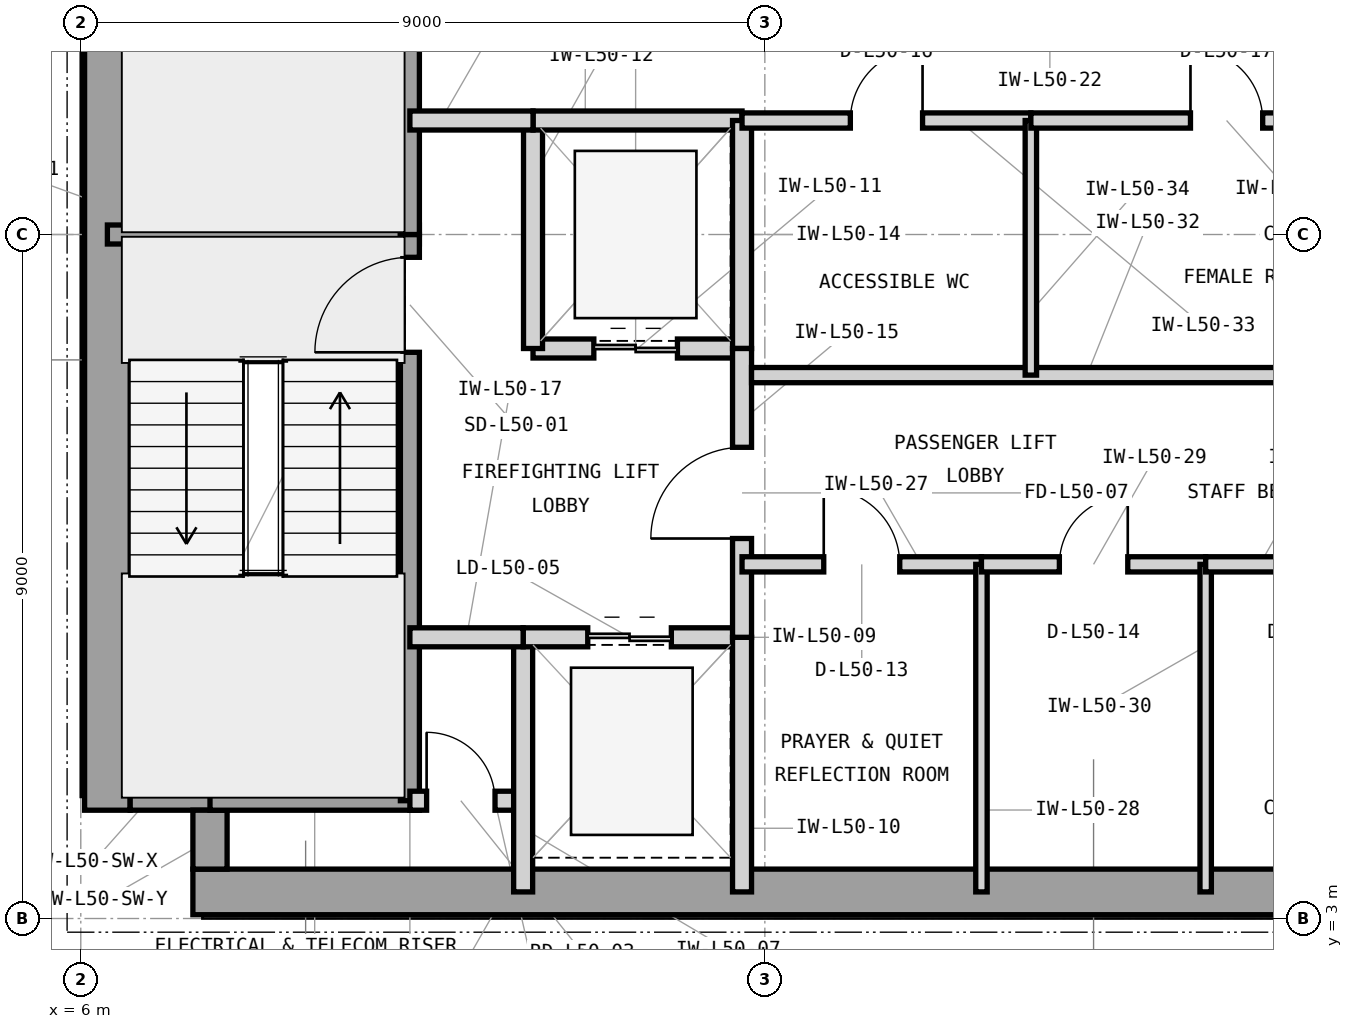
"""IFC4 building model, lengths in metres.
Left out: names, types, materials, properties, quantities, classifications, styles, units other than length and angle.
Written with IfcOpenShell. Run it as: python <this file> out.ifc"""

import sys

from ifc_helpers import new_model, si_unit, direction, frame, frame_2d, origin, place, context, subcontext, project, spatial, rectangle, extrude, element, fill, save


model = new_model("IFC4")
c1 = context("Model", 3, precision=1e-05, world=origin(), true_north=direction((0.0, 1.0)))
c2 = subcontext(c1, "Body", "Model", "MODEL_VIEW")
j1 = project(units=[si_unit("LENGTHUNIT", "METRE"), si_unit("PLANEANGLEUNIT", "RADIAN")], contexts=[c1])
p1 = place(None, origin())
s1 = spatial("IfcSite", under=j1, at=p1, CompositionType="ELEMENT")
p2 = place(p1, origin())
s2 = spatial("IfcBuilding", under=s1, at=p2, CompositionType="ELEMENT")
p3 = place(p2, frame((0.0, 0.0, 207.3)))
s3 = spatial("IfcBuildingStorey", under=s2, at=p3, CompositionType="ELEMENT", Elevation=207.3)
p4 = place(p3, frame((7.475, 3.35, 0.0), z_axis=(0.0, 0.0, 1.0), x_axis=(1.0, 0.0, 0.0)))
e1 = element("IfcWall", 1, at=p4, inside=s3, PredefinedType="SHEAR", context=c2, shape_type="SweptSolid", body=[
    extrude(rectangle(XDim=16.475, YDim=0.6, at=frame_2d((8.237, 0.0))), origin(), (0.0, 0.0, 1.0), 3.9),
])
p5 = place(p3, frame((6.35, 4.425, 0.0), z_axis=(0.0, 0.0, 1.0), x_axis=(0.0, 1.0, 0.0)))
e2 = element("IfcWall", 2, at=p5, inside=s3, PredefinedType="SHEAR", context=c2, shape_type="SweptSolid", body=[
    extrude(rectangle(XDim=15.15, YDim=0.6, at=frame_2d((7.575, 0.0))), origin(), (0.0, 0.0, 1.0), 3.9),
])
p6 = place(p3, frame((6.65, 4.65, 0.0), z_axis=(0.0, 0.0, 1.0), x_axis=(1.0, 0.0, 0.0)))
e3 = element("IfcWall", 3, at=p6, inside=s3, PredefinedType="SHEAR", context=c2, shape_type="SweptSolid", body=[
    extrude(rectangle(XDim=1.275, YDim=0.45, at=frame_2d((0.638, 0.0))), origin(), (0.0, 0.0, 1.0), 3.9),
])
p7 = place(p3, frame((7.7, 3.65, 0.0), z_axis=(0.0, 0.0, 1.0), x_axis=(0.0, 1.0, 0.0)))
e4 = element("IfcWall", 4, at=p7, inside=s3, PredefinedType="SHEAR", context=c2, shape_type="SweptSolid", body=[
    extrude(rectangle(XDim=0.775, YDim=0.45, at=frame_2d((0.388, 0.0))), origin(), (0.0, 0.0, 1.0), 3.9),
])
p8 = place(p3, frame((6.35, 12.0, 0.0), z_axis=(0.0, 0.0, 1.0), x_axis=(1.0, 0.0, 0.0)))
e5 = element("IfcWall", 5, at=p8, inside=s3, PredefinedType="SHEAR", context=c2, shape_type="SweptSolid", body=[
    extrude(rectangle(XDim=4.105, YDim=0.25, at=frame_2d((2.052, 0.0))), origin(), (0.0, 0.0, 1.0), 3.9),
])
p9 = place(p3, frame((7.7, 4.55, 0.0), z_axis=(0.0, 0.0, 1.0), x_axis=(1.0, 0.0, 0.0)))
e6 = element("IfcWall", 6, at=p9, inside=s3, PredefinedType="SHEAR", context=c2, shape_type="SweptSolid", body=[
    extrude(rectangle(XDim=2.755, YDim=0.25, at=frame_2d((1.377, 0.0))), origin(), (0.0, 0.0, 1.0), 3.9),
])
p10 = place(p3, frame((10.33, 4.55, 0.0), z_axis=(0.0, 0.0, 1.0), x_axis=(0.0, 1.0, 0.0)))
e7 = element("IfcWall", 7, at=p10, inside=s3, PredefinedType="SHEAR", context=c2, shape_type="SweptSolid", body=[
    extrude(rectangle(XDim=7.45, YDim=0.25, at=frame_2d((3.725, 0.0))), origin(), (0.0, 0.0, 1.0), 3.9),
])
p11 = place(p10, frame((5.9, 0.0, 0.0)))
e8 = element("IfcOpeningElement", 8, at=p11, cuts=e7, PredefinedType="OPENING", context=c2, shape_type="SweptSolid", body=[
    extrude(rectangle(XDim=1.25, YDim=2.2, at=frame_2d((0.625, 1.1))), frame((0.0, 0.135, 0.0), z_axis=(0.0, -1.0, 0.0), x_axis=(1.0, 0.0, 0.0)), (0.0, 0.0, 1.0), 0.27),
])
p12 = place(p3, frame((10.33, 12.0, 0.0), z_axis=(0.0, 0.0, 1.0), x_axis=(0.0, 1.0, 0.0)))
e9 = element("IfcWall", 9, at=p12, inside=s3, PredefinedType="SHEAR", context=c2, shape_type="SweptSolid", body=[
    extrude(rectangle(XDim=7.45, YDim=0.25, at=frame_2d((3.725, 0.0))), origin(), (0.0, 0.0, 1.0), 3.9),
])
p13 = place(p12, frame((5.85, 0.0, 0.0)))
e10 = element("IfcOpeningElement", 10, at=p13, cuts=e9, PredefinedType="OPENING", context=c2, shape_type="SweptSolid", body=[
    extrude(rectangle(XDim=1.25, YDim=2.2, at=frame_2d((0.625, 1.1))), frame((0.0, 0.135, 0.0), z_axis=(0.0, -1.0, 0.0), x_axis=(1.0, 0.0, 0.0)), (0.0, 0.0, 1.0), 0.27),
])
p14 = place(p3, frame((10.33, 4.55, 0.0), z_axis=(0.0, 0.0, 1.0), x_axis=(1.0, 0.0, 0.0)))
e11 = element("IfcWall", 11, at=p14, inside=s3, PredefinedType="PARTITIONING", context=c2, shape_type="SweptSolid", body=[
    extrude(rectangle(XDim=1.49, YDim=0.25, at=frame_2d((0.745, 0.0))), origin(), (0.0, 0.0, 1.0), 3.69),
])
p15 = place(p14, frame((0.22, 0.0, 0.0)))
e12 = element("IfcOpeningElement", 12, at=p15, cuts=e11, PredefinedType="OPENING", context=c2, shape_type="SweptSolid", body=[
    extrude(rectangle(XDim=0.9, YDim=2.1, at=frame_2d((0.45, 1.05))), frame((0.0, 0.135, 0.0), z_axis=(0.0, -1.0, 0.0), x_axis=(1.0, 0.0, 0.0)), (0.0, 0.0, 1.0), 0.27),
])
p16 = place(p3, frame((11.82, 3.35, 0.0), z_axis=(0.0, 0.0, 1.0), x_axis=(0.0, 1.0, 0.0)))
e13 = element("IfcWall", 13, at=p16, inside=s3, PredefinedType="PARTITIONING", context=c2, shape_type="SweptSolid", body=[
    extrude(rectangle(XDim=3.35, YDim=0.25, at=frame_2d((1.675, 0.0))), origin(), (0.0, 0.0, 1.0), 3.69),
])
p17 = place(p3, frame((11.82, 6.7, 0.0), z_axis=(0.0, 0.0, 1.0), x_axis=(1.0, 0.0, 0.0)))
e14 = element("IfcWall", 14, at=p17, inside=s3, PredefinedType="PARTITIONING", context=c2, shape_type="SweptSolid", body=[
    extrude(rectangle(XDim=2.88, YDim=0.25, at=frame_2d((1.44, 0.0))), origin(), (0.0, 0.0, 1.0), 3.283),
])
p18 = place(p17, frame((0.85, 0.0, 0.0)))
e15 = element("IfcOpeningElement", 15, at=p18, cuts=e14, PredefinedType="OPENING", context=c2, shape_type="SweptSolid", body=[
    extrude(rectangle(XDim=1.1, YDim=2.25, at=frame_2d((0.55, 1.125))), frame((0.0, 0.135, 0.0), z_axis=(0.0, -1.0, 0.0), x_axis=(1.0, 0.0, 0.0)), (0.0, 0.0, 1.0), 0.27),
])
p19 = place(p3, frame((14.7, 3.35, 0.0), z_axis=(0.0, 0.0, 1.0), x_axis=(0.0, 1.0, 0.0)))
e16 = element("IfcWall", 16, at=p19, inside=s3, PredefinedType="PARTITIONING", context=c2, shape_type="SweptSolid", body=[
    extrude(rectangle(XDim=3.35, YDim=0.25, at=frame_2d((1.675, 0.0))), origin(), (0.0, 0.0, 1.0), 3.69),
])
p20 = place(p3, frame((11.95, 10.5, 0.0), z_axis=(0.0, 0.0, 1.0), x_axis=(1.0, 0.0, 0.0)))
e17 = element("IfcWall", 17, at=p20, inside=s3, PredefinedType="PARTITIONING", context=c2, shape_type="SweptSolid", body=[
    extrude(rectangle(XDim=2.75, YDim=0.25, at=frame_2d((1.375, 0.0))), origin(), (0.0, 0.0, 1.0), 3.283),
])
p21 = place(p20, frame((0.8, 0.0, 0.0)))
e18 = element("IfcOpeningElement", 18, at=p21, cuts=e17, PredefinedType="OPENING", context=c2, shape_type="SweptSolid", body=[
    extrude(rectangle(XDim=1.1, YDim=2.25, at=frame_2d((0.55, 1.125))), frame((0.0, 0.135, 0.0), z_axis=(0.0, -1.0, 0.0), x_axis=(1.0, 0.0, 0.0)), (0.0, 0.0, 1.0), 0.27),
])
p22 = place(p3, frame((11.95, 10.5, 0.0), z_axis=(0.0, 0.0, 1.0), x_axis=(0.0, 1.0, 0.0)))
e19 = element("IfcWall", 19, at=p22, inside=s3, PredefinedType="PARTITIONING", context=c2, shape_type="SweptSolid", body=[
    extrude(rectangle(XDim=3.0, YDim=0.25, at=frame_2d((1.5, 0.0))), origin(), (0.0, 0.0, 1.0), 3.69),
])
p23 = place(p3, frame((11.95, 13.5, 0.0), z_axis=(0.0, 0.0, 1.0), x_axis=(1.0, 0.0, 0.0)))
e20 = element("IfcWall", 20, at=p23, inside=s3, PredefinedType="PARTITIONING", context=c2, shape_type="SweptSolid", body=[
    extrude(rectangle(XDim=2.75, YDim=0.25, at=frame_2d((1.375, 0.0))), origin(), (0.0, 0.0, 1.0), 3.283),
])
p24 = place(p3, frame((14.7, 10.5, 0.0), z_axis=(0.0, 0.0, 1.0), x_axis=(0.0, 1.0, 0.0)))
e21 = element("IfcWall", 21, at=p24, inside=s3, PredefinedType="PARTITIONING", context=c2, shape_type="SweptSolid", body=[
    extrude(rectangle(XDim=3.0, YDim=0.25, at=frame_2d((1.5, 0.0))), origin(), (0.0, 0.0, 1.0), 3.69),
])
p25 = place(p3, frame((14.7, 6.7, 0.0), z_axis=(0.0, 0.0, 1.0), x_axis=(0.0, 1.0, 0.0)))
e22 = element("IfcWall", 22, at=p25, inside=s3, PredefinedType="PARTITIONING", context=c2, shape_type="SweptSolid", body=[
    extrude(rectangle(XDim=3.8, YDim=0.25, at=frame_2d((1.9, 0.0))), origin(), (0.0, 0.0, 1.0), 3.69),
])
p26 = place(p25, frame((1.3, 0.0, 0.0)))
e23 = element("IfcOpeningElement", 23, at=p26, cuts=e22, PredefinedType="OPENING", context=c2, shape_type="SweptSolid", body=[
    extrude(rectangle(XDim=1.2, YDim=2.2, at=frame_2d((0.6, 1.1))), frame((0.0, 0.135, 0.0), z_axis=(0.0, -1.0, 0.0), x_axis=(1.0, 0.0, 0.0)), (0.0, 0.0, 1.0), 0.27),
])
p27 = place(p3, frame((10.33, 13.5, 0.0), z_axis=(0.0, 0.0, 1.0), x_axis=(1.0, 0.0, 0.0)))
e24 = element("IfcWall", 24, at=p27, inside=s3, PredefinedType="PARTITIONING", context=c2, shape_type="SweptSolid", body=[
    extrude(rectangle(XDim=1.62, YDim=0.25, at=frame_2d((0.81, 0.0))), origin(), (0.0, 0.0, 1.0), 3.283),
])
p28 = place(p3, frame((10.33, 6.7, 0.0), z_axis=(0.0, 0.0, 1.0), x_axis=(1.0, 0.0, 0.0)))
e25 = element("IfcWall", 25, at=p28, inside=s3, PredefinedType="PARTITIONING", context=c2, shape_type="SweptSolid", body=[
    extrude(rectangle(XDim=1.49, YDim=0.25, at=frame_2d((0.745, 0.0))), origin(), (0.0, 0.0, 1.0), 3.283),
])
p29 = place(p3, frame((14.7, 7.66, 0.0), z_axis=(0.0, 0.0, 1.0), x_axis=(1.0, 0.0, 0.0)))
e26 = element("IfcWall", 26, at=p29, inside=s3, PredefinedType="PARTITIONING", context=c2, shape_type="SweptSolid", body=[
    extrude(rectangle(XDim=3.15, YDim=0.2, at=frame_2d((1.575, 0.0))), origin(), (0.0, 0.0, 1.0), 3.69),
])
p30 = place(p29, frame((1.075, 0.0, 0.0)))
e27 = element("IfcOpeningElement", 27, at=p30, cuts=e26, PredefinedType="OPENING", context=c2, shape_type="SweptSolid", body=[
    extrude(rectangle(XDim=1.0, YDim=2.15, at=frame_2d((0.5, 1.075))), frame((0.0, 0.11, 0.0), z_axis=(0.0, -1.0, 0.0), x_axis=(1.0, 0.0, 0.0)), (0.0, 0.0, 1.0), 0.22),
])
p31 = place(p3, frame((17.85, 3.35, 0.0), z_axis=(0.0, 0.0, 1.0), x_axis=(0.0, 1.0, 0.0)))
e28 = element("IfcWall", 28, at=p31, inside=s3, PredefinedType="PARTITIONING", context=c2, shape_type="SweptSolid", body=[
    extrude(rectangle(XDim=4.31, YDim=0.15, at=frame_2d((2.155, 0.0))), origin(), (0.0, 0.0, 1.0), 3.69),
])
p32 = place(p3, frame((17.85, 7.66, 0.0), z_axis=(0.0, 0.0, 1.0), x_axis=(1.0, 0.0, 0.0)))
e29 = element("IfcWall", 29, at=p32, inside=s3, PredefinedType="PARTITIONING", context=c2, shape_type="SweptSolid", body=[
    extrude(rectangle(XDim=2.95, YDim=0.2, at=frame_2d((1.475, 0.0))), origin(), (0.0, 0.0, 1.0), 3.69),
])
p33 = place(p32, frame((1.025, 0.0, 0.0)))
e30 = element("IfcOpeningElement", 30, at=p33, cuts=e29, PredefinedType="OPENING", context=c2, shape_type="SweptSolid", body=[
    extrude(rectangle(XDim=0.9, YDim=2.1, at=frame_2d((0.45, 1.05))), frame((0.0, 0.11, 0.0), z_axis=(0.0, -1.0, 0.0), x_axis=(1.0, 0.0, 0.0)), (0.0, 0.0, 1.0), 0.22),
])
p34 = place(p3, frame((20.8, 3.35, 0.0), z_axis=(0.0, 0.0, 1.0), x_axis=(0.0, 1.0, 0.0)))
e31 = element("IfcWall", 31, at=p34, inside=s3, PredefinedType="PARTITIONING", context=c2, shape_type="SweptSolid", body=[
    extrude(rectangle(XDim=4.31, YDim=0.15, at=frame_2d((2.155, 0.0))), origin(), (0.0, 0.0, 1.0), 3.69),
])
p35 = place(p3, frame((20.8, 7.66, 0.0), z_axis=(0.0, 0.0, 1.0), x_axis=(1.0, 0.0, 0.0)))
e32 = element("IfcWall", 32, at=p35, inside=s3, PredefinedType="PARTITIONING", context=c2, shape_type="SweptSolid", body=[
    extrude(rectangle(XDim=2.85, YDim=0.2, at=frame_2d((1.425, 0.0))), origin(), (0.0, 0.0, 1.0), 3.69),
])
p36 = place(p35, frame((0.95, 0.0, 0.0)))
e33 = element("IfcOpeningElement", 33, at=p36, cuts=e32, PredefinedType="OPENING", context=c2, shape_type="SweptSolid", body=[
    extrude(rectangle(XDim=0.95, YDim=2.1, at=frame_2d((0.475, 1.05))), frame((0.0, 0.11, 0.0), z_axis=(0.0, -1.0, 0.0), x_axis=(1.0, 0.0, 0.0)), (0.0, 0.0, 1.0), 0.22),
])
p37 = place(p3, frame((14.825, 10.15, 0.0), z_axis=(0.0, 0.0, 1.0), x_axis=(1.0, 0.0, 0.0)))
e34 = element("IfcWall", 34, at=p37, inside=s3, PredefinedType="PARTITIONING", context=c2, shape_type="SweptSolid", body=[
    extrude(rectangle(XDim=8.825, YDim=0.2, at=frame_2d((4.413, 0.0))), origin(), (0.0, 0.0, 1.0), 3.69),
])
p38 = place(p3, frame((14.7, 13.5, 0.0), z_axis=(0.0, 0.0, 1.0), x_axis=(1.0, 0.0, 0.0)))
e35 = element("IfcWall", 35, at=p38, inside=s3, PredefinedType="PARTITIONING", context=c2, shape_type="SweptSolid", body=[
    extrude(rectangle(XDim=3.8, YDim=0.2, at=frame_2d((1.9, 0.0))), origin(), (0.0, 0.0, 1.0), 3.283),
])
p39 = place(p38, frame((1.425, 0.0, 0.0)))
e36 = element("IfcOpeningElement", 36, at=p39, cuts=e35, PredefinedType="OPENING", context=c2, shape_type="SweptSolid", body=[
    extrude(rectangle(XDim=0.95, YDim=2.1, at=frame_2d((0.475, 1.05))), frame((0.0, 0.11, 0.0), z_axis=(0.0, -1.0, 0.0), x_axis=(1.0, 0.0, 0.0)), (0.0, 0.0, 1.0), 0.22),
])
p40 = place(p3, frame((18.5, 10.15, 0.0), z_axis=(0.0, 0.0, 1.0), x_axis=(0.0, 1.0, 0.0)))
e37 = element("IfcWall", 37, at=p40, inside=s3, PredefinedType="PARTITIONING", context=c2, shape_type="SweptSolid", body=[
    extrude(rectangle(XDim=3.35, YDim=0.15, at=frame_2d((1.675, 0.0))), origin(), (0.0, 0.0, 1.0), 3.69),
])
p41 = place(p3, frame((18.5, 13.5, 0.0), z_axis=(0.0, 0.0, 1.0), x_axis=(1.0, 0.0, 0.0)))
e38 = element("IfcWall", 38, at=p41, inside=s3, PredefinedType="PARTITIONING", context=c2, shape_type="SweptSolid", body=[
    extrude(rectangle(XDim=5.15, YDim=0.2, at=frame_2d((2.575, 0.0))), origin(), (0.0, 0.0, 1.0), 3.283),
])
p42 = place(p41, frame((2.1, 0.0, 0.0)))
e39 = element("IfcOpeningElement", 39, at=p42, cuts=e38, PredefinedType="OPENING", context=c2, shape_type="SweptSolid", body=[
    extrude(rectangle(XDim=0.95, YDim=2.1, at=frame_2d((0.475, 1.05))), frame((0.0, 0.11, 0.0), z_axis=(0.0, -1.0, 0.0), x_axis=(1.0, 0.0, 0.0)), (0.0, 0.0, 1.0), 0.22),
])
p43 = place(p11, origin())
e40 = element("IfcDoor", 40, at=p43, inside=s3, OperationType="SINGLE_SWING_LEFT", PredefinedType="DOOR", context=c2, shape_type="SweptSolid", body=[
    extrude(rectangle(XDim=1.25, YDim=2.2, at=frame_2d((0.625, 1.1))), frame((0.0, 0.025, 0.0), z_axis=(0.0, -1.0, 0.0), x_axis=(1.0, 0.0, 0.0)), (0.0, 0.0, 1.0), 0.05),
])
fill(e8, e40)
p44 = place(p15, origin())
e41 = element("IfcDoor", 41, at=p44, inside=s3, OperationType="SINGLE_SWING_LEFT", PredefinedType="TRAPDOOR", context=c2, shape_type="SweptSolid", body=[
    extrude(rectangle(XDim=0.9, YDim=2.1, at=frame_2d((0.45, 1.05))), frame((0.0, 0.025, 0.0), z_axis=(0.0, -1.0, 0.0), x_axis=(1.0, 0.0, 0.0)), (0.0, 0.0, 1.0), 0.05),
])
fill(e12, e41)
p45 = place(p18, origin())
e42 = element("IfcDoor", 42, at=p45, inside=s3, OperationType="DOUBLE_DOOR_SLIDING", PredefinedType="DOOR", context=c2, shape_type="SweptSolid", body=[
    extrude(rectangle(XDim=1.1, YDim=2.25, at=frame_2d((0.55, 1.125))), frame((0.0, 0.025, 0.0), z_axis=(0.0, -1.0, 0.0), x_axis=(1.0, 0.0, 0.0)), (0.0, 0.0, 1.0), 0.05),
])
fill(e15, e42)
p46 = place(p21, origin())
e43 = element("IfcDoor", 43, at=p46, inside=s3, OperationType="DOUBLE_DOOR_SLIDING", PredefinedType="DOOR", context=c2, shape_type="SweptSolid", body=[
    extrude(rectangle(XDim=1.1, YDim=2.25, at=frame_2d((0.55, 1.125))), frame((0.0, 0.025, 0.0), z_axis=(0.0, -1.0, 0.0), x_axis=(1.0, 0.0, 0.0)), (0.0, 0.0, 1.0), 0.05),
])
fill(e18, e43)
p47 = place(p26, origin())
e44 = element("IfcDoor", 44, at=p47, inside=s3, OperationType="SINGLE_SWING_LEFT", PredefinedType="DOOR", context=c2, shape_type="SweptSolid", body=[
    extrude(rectangle(XDim=1.2, YDim=2.2, at=frame_2d((0.6, 1.1))), frame((0.0, 0.025, 0.0), z_axis=(0.0, -1.0, 0.0), x_axis=(1.0, 0.0, 0.0)), (0.0, 0.0, 1.0), 0.05),
])
fill(e23, e44)
p48 = place(p30, origin())
e45 = element("IfcDoor", 45, at=p48, inside=s3, OperationType="SINGLE_SWING_LEFT", PredefinedType="DOOR", context=c2, shape_type="SweptSolid", body=[
    extrude(rectangle(XDim=1.0, YDim=2.15, at=frame_2d((0.5, 1.075))), frame((0.0, 0.025, 0.0), z_axis=(0.0, -1.0, 0.0), x_axis=(1.0, 0.0, 0.0)), (0.0, 0.0, 1.0), 0.05),
])
fill(e27, e45)
p49 = place(p33, origin())
e46 = element("IfcDoor", 46, at=p49, inside=s3, OperationType="SINGLE_SWING_RIGHT", PredefinedType="TRAPDOOR", context=c2, shape_type="SweptSolid", body=[
    extrude(rectangle(XDim=0.9, YDim=2.1, at=frame_2d((0.45, 1.05))), frame((0.0, 0.025, 0.0), z_axis=(0.0, -1.0, 0.0), x_axis=(1.0, 0.0, 0.0)), (0.0, 0.0, 1.0), 0.05),
])
fill(e30, e46)
p50 = place(p39, origin())
e47 = element("IfcDoor", 47, at=p50, inside=s3, OperationType="SINGLE_SWING_RIGHT", PredefinedType="DOOR", context=c2, shape_type="SweptSolid", body=[
    extrude(rectangle(XDim=0.95, YDim=2.1, at=frame_2d((0.475, 1.05))), frame((0.0, 0.025, 0.0), z_axis=(0.0, -1.0, 0.0), x_axis=(1.0, 0.0, 0.0)), (0.0, 0.0, 1.0), 0.05),
])
fill(e36, e47)
p51 = place(p42, origin())
e48 = element("IfcDoor", 48, at=p51, inside=s3, OperationType="SINGLE_SWING_LEFT", PredefinedType="DOOR", context=c2, shape_type="SweptSolid", body=[
    extrude(rectangle(XDim=0.95, YDim=2.1, at=frame_2d((0.475, 1.05))), frame((0.0, 0.025, 0.0), z_axis=(0.0, -1.0, 0.0), x_axis=(1.0, 0.0, 0.0)), (0.0, 0.0, 1.0), 0.05),
])
fill(e39, e48)
save(model, sys.argv[1])
